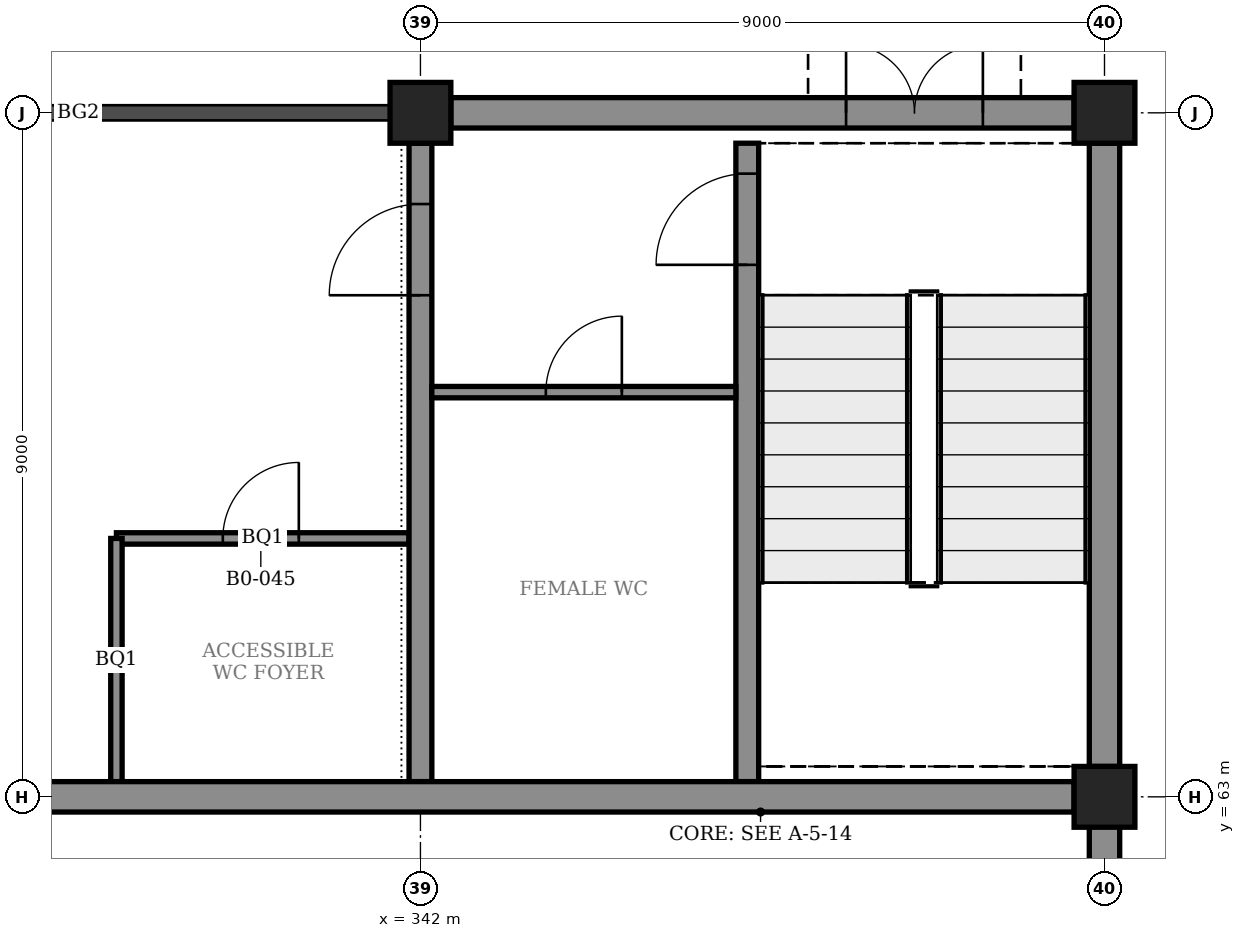
"""IFC4 building model, lengths in metres.
Left out: names, types, materials, properties, quantities, classifications, styles, units other than length and angle.
Written with IfcOpenShell. Run it as: python <this file> out.ifc"""

import sys

from ifc_helpers import new_model, si_unit, direction, frame, frame_2d, origin, origin_2d, place, context, subcontext, project, spatial, polyline, rectangle, outline, extrude, element, fill, save


model = new_model("IFC4")
c1 = context("Model", 3, precision=1e-05, world=origin(), true_north=direction((0.0, 1.0)))
c2 = subcontext(c1, "Body", "Model", "MODEL_VIEW")
j1 = project(units=[si_unit("LENGTHUNIT", "METRE"), si_unit("PLANEANGLEUNIT", "RADIAN")], contexts=[c1])
p1 = place(None, origin())
s1 = spatial("IfcSite", under=j1, at=p1, CompositionType="ELEMENT")
p2 = place(p1, origin())
s2 = spatial("IfcBuilding", under=s1, at=p2, CompositionType="ELEMENT")
p3 = place(p2, origin())
s3 = spatial("IfcBuildingStorey", under=s2, at=p3, CompositionType="ELEMENT", Elevation=0.0)
for number, where, z_axis, x_axis in (
    (1, (351.0, 63.0, -0.3), (0.0, 0.0, 1.0), (1.0, 0.0, 0.0)),
    (2, (342.0, 72.0, -0.3), (0.0, 0.0, 1.0), (1.0, 0.0, 0.0)),
    (3, (351.0, 72.0, -0.3), (0.0, 0.0, 1.0), (1.0, 0.0, 0.0)),
):
    element("IfcColumn", number, at=place(p3, frame(where, z_axis=z_axis, x_axis=x_axis)), inside=s3, PredefinedType="COLUMN", context=c2, shape_type="SweptSolid", body=[
        extrude(rectangle(XDim=0.8, YDim=0.8, at=origin_2d()), origin(), (0.0, 0.0, 1.0), 6.02),
    ])
p4 = place(p3, frame((288.4, 63.0, -0.3), z_axis=(0.0, 0.0, 1.0), x_axis=(1.0, 0.0, 0.0)))
e4 = element("IfcWall", 4, at=p4, inside=s3, PredefinedType="SHEAR", context=c2, shape_type="SweptSolid", body=[
    extrude(rectangle(XDim=62.2, YDim=0.4, at=frame_2d((31.1, 0.0))), origin(), (0.0, 0.0, 1.0), 10.625),
])
p5 = place(p4, frame((14.25, 0.0, 0.3)))
e5 = element("IfcOpeningElement", 5, at=p5, cuts=e4, PredefinedType="OPENING", context=c2, shape_type="SweptSolid", body=[
    extrude(rectangle(XDim=2.7, YDim=2.4, at=frame_2d((1.35, 1.2))), frame((0.0, 0.21, 0.0), z_axis=(0.0, -1.0, 0.0), x_axis=(1.0, 0.0, 0.0)), (0.0, 0.0, 1.0), 0.42),
])
p6 = place(p4, frame((19.45, 0.0, 0.3)))
e6 = element("IfcOpeningElement", 6, at=p6, cuts=e4, PredefinedType="OPENING", context=c2, shape_type="SweptSolid", body=[
    extrude(rectangle(XDim=2.7, YDim=2.4, at=frame_2d((1.35, 1.2))), frame((0.0, 0.21, 0.0), z_axis=(0.0, -1.0, 0.0), x_axis=(1.0, 0.0, 0.0)), (0.0, 0.0, 1.0), 0.42),
])
p7 = place(p4, frame((24.65, 0.0, 0.3)))
e7 = element("IfcOpeningElement", 7, at=p7, cuts=e4, PredefinedType="OPENING", context=c2, shape_type="SweptSolid", body=[
    extrude(rectangle(XDim=2.7, YDim=2.4, at=frame_2d((1.35, 1.2))), frame((0.0, 0.21, 0.0), z_axis=(0.0, -1.0, 0.0), x_axis=(1.0, 0.0, 0.0)), (0.0, 0.0, 1.0), 0.42),
])
p8 = place(p4, frame((29.85, 0.0, 0.3)))
e8 = element("IfcOpeningElement", 8, at=p8, cuts=e4, PredefinedType="OPENING", context=c2, shape_type="SweptSolid", body=[
    extrude(rectangle(XDim=2.7, YDim=2.4, at=frame_2d((1.35, 1.2))), frame((0.0, 0.21, 0.0), z_axis=(0.0, -1.0, 0.0), x_axis=(1.0, 0.0, 0.0)), (0.0, 0.0, 1.0), 0.42),
])
p9 = place(p4, frame((35.05, 0.0, 0.3)))
e9 = element("IfcOpeningElement", 9, at=p9, cuts=e4, PredefinedType="OPENING", context=c2, shape_type="SweptSolid", body=[
    extrude(rectangle(XDim=2.7, YDim=2.4, at=frame_2d((1.35, 1.2))), frame((0.0, 0.21, 0.0), z_axis=(0.0, -1.0, 0.0), x_axis=(1.0, 0.0, 0.0)), (0.0, 0.0, 1.0), 0.42),
])
p10 = place(p4, frame((40.25, 0.0, 0.3)))
e10 = element("IfcOpeningElement", 10, at=p10, cuts=e4, PredefinedType="OPENING", context=c2, shape_type="SweptSolid", body=[
    extrude(rectangle(XDim=2.7, YDim=2.4, at=frame_2d((1.35, 1.2))), frame((0.0, 0.21, 0.0), z_axis=(0.0, -1.0, 0.0), x_axis=(1.0, 0.0, 0.0)), (0.0, 0.0, 1.0), 0.42),
])
p11 = place(p4, frame((45.45, 0.0, 0.3)))
e11 = element("IfcOpeningElement", 11, at=p11, cuts=e4, PredefinedType="OPENING", context=c2, shape_type="SweptSolid", body=[
    extrude(rectangle(XDim=2.7, YDim=2.4, at=frame_2d((1.35, 1.2))), frame((0.0, 0.21, 0.0), z_axis=(0.0, -1.0, 0.0), x_axis=(1.0, 0.0, 0.0)), (0.0, 0.0, 1.0), 0.42),
])
p12 = place(p3, frame((351.0, 27.4, 0.0), z_axis=(0.0, 0.0, 1.0), x_axis=(0.0, 1.0, 0.0)))
e12 = element("IfcWall", 12, at=p12, inside=s3, PredefinedType="STANDARD", context=c2, shape_type="SweptSolid", body=[
    extrude(outline(polyline([(0.0, 0.0), (35.2, 0.0), (35.2, 9.75), (35.5, 9.75), (35.5, 17.708), (0.0, 11.448), (0.0, 0.0)])), frame((0.0, 0.2, 0.0), z_axis=(0.0, -1.0, 0.0), x_axis=(1.0, 0.0, 0.0)), (0.0, 0.0, 1.0), 0.4),
])
p13 = place(p12, frame((2.75, 0.0, 0.0)))
e13 = element("IfcOpeningElement", 13, at=p13, cuts=e12, PredefinedType="OPENING", context=c2, shape_type="SweptSolid", body=[
    extrude(rectangle(XDim=2.7, YDim=2.4, at=frame_2d((1.35, 1.2))), frame((0.0, 0.21, 0.0), z_axis=(0.0, -1.0, 0.0), x_axis=(1.0, 0.0, 0.0)), (0.0, 0.0, 1.0), 0.42),
])
p14 = place(p12, frame((11.75, 0.0, 0.0)))
e14 = element("IfcOpeningElement", 14, at=p14, cuts=e12, PredefinedType="OPENING", context=c2, shape_type="SweptSolid", body=[
    extrude(rectangle(XDim=2.7, YDim=2.4, at=frame_2d((1.35, 1.2))), frame((0.0, 0.21, 0.0), z_axis=(0.0, -1.0, 0.0), x_axis=(1.0, 0.0, 0.0)), (0.0, 0.0, 1.0), 0.42),
])
p15 = place(p12, frame((20.75, 0.0, 0.0)))
e15 = element("IfcOpeningElement", 15, at=p15, cuts=e12, PredefinedType="OPENING", context=c2, shape_type="SweptSolid", body=[
    extrude(rectangle(XDim=2.7, YDim=2.4, at=frame_2d((1.35, 1.2))), frame((0.0, 0.21, 0.0), z_axis=(0.0, -1.0, 0.0), x_axis=(1.0, 0.0, 0.0)), (0.0, 0.0, 1.0), 0.42),
])
p16 = place(p12, frame((29.75, 0.0, 0.0)))
e16 = element("IfcOpeningElement", 16, at=p16, cuts=e12, PredefinedType="OPENING", context=c2, shape_type="SweptSolid", body=[
    extrude(rectangle(XDim=2.7, YDim=2.4, at=frame_2d((1.35, 1.2))), frame((0.0, 0.21, 0.0), z_axis=(0.0, -1.0, 0.0), x_axis=(1.0, 0.0, 0.0)), (0.0, 0.0, 1.0), 0.42),
])
p17 = place(p3, frame((351.0, 63.4, 0.0), z_axis=(0.0, 0.0, 1.0), x_axis=(0.0, 1.0, 0.0)))
e17 = element("IfcWall", 17, at=p17, inside=s3, PredefinedType="STANDARD", context=c2, shape_type="SweptSolid", body=[
    extrude(rectangle(XDim=8.2, YDim=0.4, at=frame_2d((4.1, 0.0))), origin(), (0.0, 0.0, 1.0), 5.02),
])
p18 = place(p3, frame((342.4, 72.0, 0.0), z_axis=(0.0, 0.0, 1.0), x_axis=(1.0, 0.0, 0.0)))
e18 = element("IfcWall", 18, at=p18, inside=s3, PredefinedType="STANDARD", context=c2, shape_type="SweptSolid", body=[
    extrude(rectangle(XDim=8.2, YDim=0.4, at=frame_2d((4.1, 0.0))), origin(), (0.0, 0.0, 1.0), 5.02),
])
p19 = place(p18, frame((5.2, 0.0, 0.0)))
e19 = element("IfcOpeningElement", 19, at=p19, cuts=e18, PredefinedType="OPENING", context=c2, shape_type="SweptSolid", body=[
    extrude(rectangle(XDim=1.8, YDim=2.4, at=frame_2d((0.9, 1.2))), frame((0.0, 0.21, 0.0), z_axis=(0.0, -1.0, 0.0), x_axis=(1.0, 0.0, 0.0)), (0.0, 0.0, 1.0), 0.42),
])
p20 = place(p3, frame((346.3, 63.2, 0.0), z_axis=(0.0, 0.0, 1.0), x_axis=(0.0, 1.0, 0.0)))
e20 = element("IfcWall", 20, at=p20, inside=s3, PredefinedType="STANDARD", context=c2, shape_type="SweptSolid", body=[
    extrude(rectangle(XDim=8.4, YDim=0.3, at=frame_2d((4.2, 0.0))), origin(), (0.0, 0.0, 1.0), 5.72),
])
p21 = place(p20, frame((6.8, 0.0, 0.0)))
e21 = element("IfcOpeningElement", 21, at=p21, cuts=e20, PredefinedType="OPENING", context=c2, shape_type="SweptSolid", body=[
    extrude(rectangle(XDim=1.2, YDim=2.4, at=frame_2d((0.6, 1.2))), frame((0.0, 0.16, 0.0), z_axis=(0.0, -1.0, 0.0), x_axis=(1.0, 0.0, 0.0)), (0.0, 0.0, 1.0), 0.32),
])
p22 = place(p3, frame((342.0, 63.2, 0.0), z_axis=(0.0, 0.0, 1.0), x_axis=(0.0, 1.0, 0.0)))
e22 = element("IfcWall", 22, at=p22, inside=s3, PredefinedType="STANDARD", context=c2, shape_type="SweptSolid", body=[
    extrude(rectangle(XDim=8.4, YDim=0.3, at=frame_2d((4.2, 0.0))), origin(), (0.0, 0.0, 1.0), 5.02),
])
p23 = place(p22, frame((6.4, 0.0, 0.0)))
e23 = element("IfcOpeningElement", 23, at=p23, cuts=e22, PredefinedType="OPENING", context=c2, shape_type="SweptSolid", body=[
    extrude(rectangle(XDim=1.2, YDim=2.4, at=frame_2d((0.6, 1.2))), frame((0.0, 0.16, 0.0), z_axis=(0.0, -1.0, 0.0), x_axis=(1.0, 0.0, 0.0)), (0.0, 0.0, 1.0), 0.32),
])
p24 = place(p3, frame((342.15, 68.325, 0.0), z_axis=(0.0, 0.0, 1.0), x_axis=(1.0, 0.0, 0.0)))
e24 = element("IfcWall", 24, at=p24, inside=s3, PredefinedType="PARTITIONING", context=c2, shape_type="SweptSolid", body=[
    extrude(rectangle(XDim=4.0, YDim=0.15, at=frame_2d((2.0, 0.0))), origin(), (0.0, 0.0, 1.0), 5.72),
])
p25 = place(p24, frame((1.5, 0.0, 0.0)))
e25 = element("IfcOpeningElement", 25, at=p25, cuts=e24, PredefinedType="OPENING", context=c2, shape_type="SweptSolid", body=[
    extrude(rectangle(XDim=1.0, YDim=2.4, at=frame_2d((0.5, 1.2))), frame((0.0, 0.085, 0.0), z_axis=(0.0, -1.0, 0.0), x_axis=(1.0, 0.0, 0.0)), (0.0, 0.0, 1.0), 0.17),
])
p26 = place(p3, frame((338.0, 63.2, 0.0), z_axis=(0.0, 0.0, 1.0), x_axis=(0.0, 1.0, 0.0)))
e26 = element("IfcWall", 26, at=p26, inside=s3, PredefinedType="PARTITIONING", context=c2, shape_type="SweptSolid", body=[
    extrude(rectangle(XDim=3.2, YDim=0.15, at=frame_2d((1.6, 0.0))), origin(), (0.0, 0.0, 1.0), 5.72),
])
p27 = place(p3, frame((338.0, 66.4, 0.0), z_axis=(0.0, 0.0, 1.0), x_axis=(1.0, 0.0, 0.0)))
e27 = element("IfcWall", 27, at=p27, inside=s3, PredefinedType="PARTITIONING", context=c2, shape_type="SweptSolid", body=[
    extrude(rectangle(XDim=3.85, YDim=0.15, at=frame_2d((1.925, 0.0))), origin(), (0.0, 0.0, 1.0), 5.72),
])
p28 = place(p27, frame((1.4, 0.0, 0.0)))
e28 = element("IfcOpeningElement", 28, at=p28, cuts=e27, PredefinedType="OPENING", context=c2, shape_type="SweptSolid", body=[
    extrude(rectangle(XDim=1.0, YDim=2.4, at=frame_2d((0.5, 1.2))), frame((0.0, 0.085, 0.0), z_axis=(0.0, -1.0, 0.0), x_axis=(1.0, 0.0, 0.0)), (0.0, 0.0, 1.0), 0.17),
])
p29 = place(p19, origin())
e29 = element("IfcDoor", 29, at=p29, inside=s3, OperationType="DOUBLE_DOOR_SINGLE_SWING", PredefinedType="DOOR", context=c2, shape_type="SweptSolid", body=[
    extrude(rectangle(XDim=1.8, YDim=2.4, at=frame_2d((0.9, 1.2))), frame((0.0, 0.025, 0.0), z_axis=(0.0, -1.0, 0.0), x_axis=(1.0, 0.0, 0.0)), (0.0, 0.0, 1.0), 0.05),
])
fill(e19, e29)
p30 = place(p21, origin())
e30 = element("IfcDoor", 30, at=p30, inside=s3, OperationType="SINGLE_SWING_LEFT", PredefinedType="DOOR", context=c2, shape_type="SweptSolid", body=[
    extrude(rectangle(XDim=1.2, YDim=2.4, at=frame_2d((0.6, 1.2))), frame((0.0, 0.025, 0.0), z_axis=(0.0, -1.0, 0.0), x_axis=(1.0, 0.0, 0.0)), (0.0, 0.0, 1.0), 0.05),
])
fill(e21, e30)
p31 = place(p23, origin())
e31 = element("IfcDoor", 31, at=p31, inside=s3, OperationType="SINGLE_SWING_LEFT", PredefinedType="DOOR", context=c2, shape_type="SweptSolid", body=[
    extrude(rectangle(XDim=1.2, YDim=2.4, at=frame_2d((0.6, 1.2))), frame((0.0, 0.025, 0.0), z_axis=(0.0, -1.0, 0.0), x_axis=(1.0, 0.0, 0.0)), (0.0, 0.0, 1.0), 0.05),
])
fill(e23, e31)
p32 = place(p25, origin())
e32 = element("IfcDoor", 32, at=p32, inside=s3, OperationType="SINGLE_SWING_RIGHT", PredefinedType="DOOR", context=c2, shape_type="SweptSolid", body=[
    extrude(rectangle(XDim=1.0, YDim=2.4, at=frame_2d((0.5, 1.2))), frame((0.0, 0.025, 0.0), z_axis=(0.0, -1.0, 0.0), x_axis=(1.0, 0.0, 0.0)), (0.0, 0.0, 1.0), 0.05),
])
fill(e25, e32)
p33 = place(p28, origin())
e33 = element("IfcDoor", 33, at=p33, inside=s3, OperationType="SINGLE_SWING_RIGHT", PredefinedType="DOOR", context=c2, shape_type="SweptSolid", body=[
    extrude(rectangle(XDim=1.0, YDim=2.4, at=frame_2d((0.5, 1.2))), frame((0.0, 0.025, 0.0), z_axis=(0.0, -1.0, 0.0), x_axis=(1.0, 0.0, 0.0)), (0.0, 0.0, 1.0), 0.05),
])
fill(e28, e33)
save(model, sys.argv[1])
